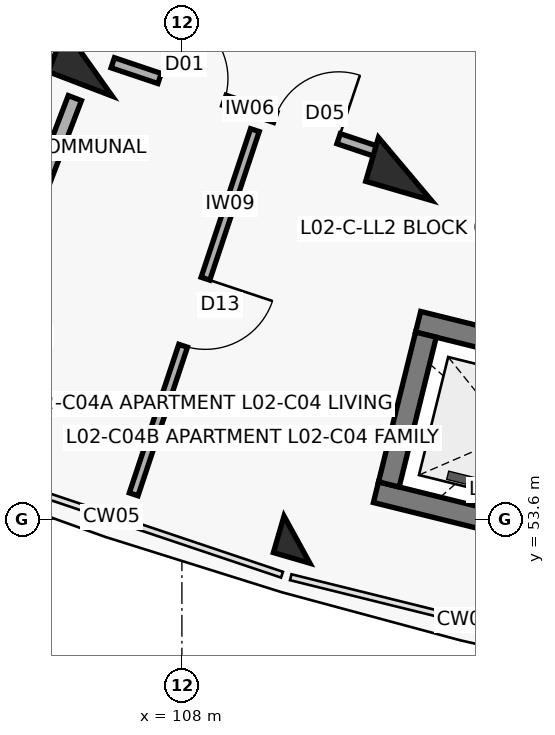
"""IFC4 building model, lengths in metres.
Left out: names, types, materials, properties, quantities, classifications, styles, units other than length and angle.
Written with IfcOpenShell. Run it as: python <this file> out.ifc"""

import sys

from ifc_helpers import new_model, si_unit, direction, frame, frame_2d, origin, origin_2d, place, context, subcontext, project, spatial, rectangle, extrude, element, fill, save


model = new_model("IFC4")
c1 = context("Model", 3, precision=1e-05, world=origin(), true_north=direction((0.0, 1.0)))
c2 = subcontext(c1, "Body", "Model", "MODEL_VIEW")
j1 = project(units=[si_unit("LENGTHUNIT", "METRE"), si_unit("PLANEANGLEUNIT", "RADIAN")], contexts=[c1])
p1 = place(None, origin())
s1 = spatial("IfcSite", under=j1, at=p1, CompositionType="ELEMENT")
p2 = place(p1, origin())
s2 = spatial("IfcBuilding", under=s1, at=p2, CompositionType="ELEMENT")
p3 = place(p2, frame((0.0, 0.0, 8.1)))
s3 = spatial("IfcBuildingStorey", under=s2, at=p3, CompositionType="ELEMENT", Elevation=8.1)
for number, where, z_axis, x_axis in (
    (1, (106.77, 59.606, 0.0), (0.0, 0.0, 1.0), (-0.357, -0.934, 0.0)),
    (2, (110.934, 58.207, 0.0), (0.0, 0.0, 1.0), (-0.28, -0.96, 0.0)),
):
    element("IfcColumn", number, at=place(p3, frame(where, z_axis=z_axis, x_axis=x_axis)), inside=s3, PredefinedType="COLUMN", context=c2, shape_type="SweptSolid", body=[
        extrude(rectangle(XDim=0.6, YDim=0.9, at=origin_2d()), origin(), (0.0, 0.0, 1.0), 3.1),
    ])
p4 = place(p3, frame((109.513, 53.329, 0.0), z_axis=(0.0, 0.0, 1.0), x_axis=(-0.27966144946, -0.96009867914, 0.0)))
e3 = element("IfcColumn", 3, at=p4, inside=s3, PredefinedType="COLUMN", context=c2, shape_type="SweptSolid", body=[
    extrude(rectangle(XDim=0.5, YDim=0.5, at=origin_2d()), origin(), (0.0, 0.0, 1.0), 3.1),
])
p5 = place(p3, frame((111.108, 56.196, 0.0), z_axis=(0.0, 0.0, 1.0), x_axis=(0.970706856107, -0.240266933861, 0.0)))
e4 = element("IfcWall", 4, at=p5, inside=s3, PredefinedType="SHEAR", context=c2, shape_type="SweptSolid", body=[
    extrude(rectangle(XDim=3.09, YDim=0.28, at=frame_2d((1.545, 0.0))), origin(), (0.0, 0.0, 1.0), 3.1),
])
p6 = place(p5, frame((0.995, 0.0, 0.0)))
e5 = element("IfcOpeningElement", 5, at=p6, cuts=e4, PredefinedType="OPENING", context=c2, shape_type="SweptSolid", body=[
    extrude(rectangle(XDim=1.1, YDim=2.15, at=frame_2d((0.55, 1.075))), frame((0.0, 0.15, 0.0), z_axis=(0.0, -1.0, 0.0), x_axis=(1.0, 0.0, 0.0)), (0.0, 0.0, 1.0), 0.3),
])
p7 = place(p3, frame((110.553, 53.954, 0.0), z_axis=(0.0, 0.0, 1.0), x_axis=(0.970725280816, -0.240192483614, 0.0)))
e6 = element("IfcWall", 6, at=p7, inside=s3, PredefinedType="SHEAR", context=c2, shape_type="SweptSolid", body=[
    extrude(rectangle(XDim=3.09, YDim=0.28, at=frame_2d((1.545, 0.0))), origin(), (0.0, 0.0, 1.0), 3.1),
])
p8 = place(p3, frame((111.21, 56.027, 0.0), z_axis=(0.0, 0.0, 1.0), x_axis=(-0.240186044774, -0.970726873995, 0.0)))
e7 = element("IfcWall", 7, at=p8, inside=s3, PredefinedType="SHEAR", context=c2, shape_type="SweptSolid", body=[
    extrude(rectangle(XDim=2.03, YDim=0.28, at=frame_2d((1.015, 0.0))), origin(), (0.0, 0.0, 1.0), 3.1),
])
p9 = place(p3, frame((107.09, 59.604, 0.0), z_axis=(0.0, 0.0, 1.0), x_axis=(0.947873924847, -0.318645606584, 0.0)))
e8 = element("IfcWall", 8, at=p9, inside=s3, PredefinedType="PARTITIONING", context=c2, shape_type="SweptSolid", body=[
    extrude(rectangle(XDim=3.785, YDim=0.14, at=frame_2d((1.893, 0.0))), origin(), (0.0, 0.0, 1.0), 2.08),
])
p10 = place(p9, frame((0.65, 0.0, 0.0)))
e9 = element("IfcOpeningElement", 9, at=p10, cuts=e8, PredefinedType="OPENING", context=c2, shape_type="SweptSolid", body=[
    extrude(rectangle(XDim=0.9, YDim=2.1, at=frame_2d((0.45, 1.05))), frame((0.0, 0.08, 0.0), z_axis=(0.0, -1.0, 0.0), x_axis=(1.0, 0.0, 0.0)), (0.0, 0.0, 1.0), 0.16),
])
p11 = place(p9, frame((2.255, 0.0, 0.0)))
e10 = element("IfcOpeningElement", 10, at=p11, cuts=e8, PredefinedType="OPENING", context=c2, shape_type="SweptSolid", body=[
    extrude(rectangle(XDim=0.88, YDim=2.1, at=frame_2d((0.44, 1.05))), frame((0.0, 0.08, 0.0), z_axis=(0.0, -1.0, 0.0), x_axis=(1.0, 0.0, 0.0)), (0.0, 0.0, 1.0), 0.16),
])
p12 = place(p3, frame((108.96, 58.718, 0.0), z_axis=(0.0, 0.0, 1.0), x_axis=(-0.315778138239, -0.948833055606, 0.0)))
e11 = element("IfcWall", 11, at=p12, inside=s3, PredefinedType="PARTITIONING", context=c2, shape_type="SweptSolid", body=[
    extrude(rectangle(XDim=5.05, YDim=0.12, at=frame_2d((2.525, 0.0))), origin(), (0.0, 0.0, 1.0), 2.08),
])
p13 = place(p12, frame((2.06, 0.0, 0.0)))
e12 = element("IfcOpeningElement", 12, at=p13, cuts=e11, PredefinedType="OPENING", context=c2, shape_type="SweptSolid", body=[
    extrude(rectangle(XDim=0.93, YDim=2.1, at=frame_2d((0.465, 1.05))), frame((0.0, 0.07, 0.0), z_axis=(0.0, -1.0, 0.0), x_axis=(1.0, 0.0, 0.0)), (0.0, 0.0, 1.0), 0.14),
])
p14 = place(p3, frame((106.591, 59.139, 0.0), z_axis=(0.0, 0.0, 1.0), x_axis=(-0.357064016205, -0.934079915388, 0.0)))
e13 = element("IfcWall", 13, at=p14, inside=s3, PredefinedType="SOLIDWALL", context=c2, shape_type="SweptSolid", body=[
    extrude(rectangle(XDim=4.35, YDim=0.185, at=frame_2d((2.175, 0.0))), origin(), (0.0, 0.0, 1.0), 2.08),
])
p15 = place(p10, origin())
e14 = element("IfcDoor", 14, at=p15, inside=s3, OperationType="SINGLE_SWING_LEFT", PredefinedType="DOOR", context=c2, shape_type="SweptSolid", body=[
    extrude(rectangle(XDim=0.9, YDim=2.1, at=frame_2d((0.45, 1.05))), frame((0.0, 0.025, 0.0), z_axis=(0.0, -1.0, 0.0), x_axis=(1.0, 0.0, 0.0)), (0.0, 0.0, 1.0), 0.05),
])
fill(e9, e14)
p16 = place(p11, origin())
e15 = element("IfcDoor", 15, at=p16, inside=s3, OperationType="SINGLE_SWING_RIGHT", PredefinedType="DOOR", context=c2, shape_type="SweptSolid", body=[
    extrude(rectangle(XDim=0.88, YDim=2.1, at=frame_2d((0.44, 1.05))), frame((0.0, 0.025, 0.0), z_axis=(0.0, -1.0, 0.0), x_axis=(1.0, 0.0, 0.0)), (0.0, 0.0, 1.0), 0.05),
])
fill(e10, e15)
p17 = place(p13, origin())
e16 = element("IfcDoor", 16, at=p17, inside=s3, OperationType="SINGLE_SWING_LEFT", PredefinedType="DOOR", context=c2, shape_type="SweptSolid", body=[
    extrude(rectangle(XDim=0.93, YDim=2.1, at=frame_2d((0.465, 1.05))), frame((0.0, 0.025, 0.0), z_axis=(0.0, -1.0, 0.0), x_axis=(1.0, 0.0, 0.0)), (0.0, 0.0, 1.0), 0.05),
])
fill(e12, e16)
save(model, sys.argv[1])
